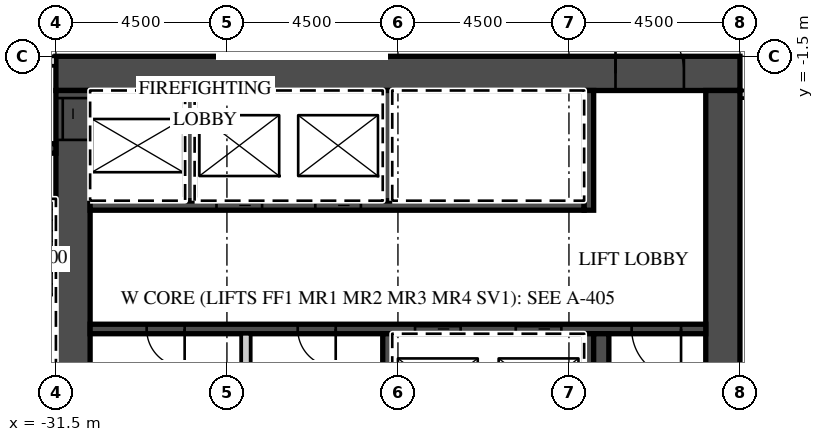
"""IFC4 building model, lengths in metres.
Left out: names, types, materials, properties, quantities, classifications, styles, units other than length and angle.
Written with IfcOpenShell. Run it as: python <this file> out.ifc"""

import sys

from ifc_helpers import new_model, si_unit, direction, frame, frame_2d, origin, place, context, subcontext, project, spatial, rectangle, extrude, element, fill, save


model = new_model("IFC4")
c1 = context("Model", 3, precision=1e-05, world=origin(), true_north=direction((0.0, 1.0)))
c2 = subcontext(c1, "Body", "Model", "MODEL_VIEW")
j1 = project(units=[si_unit("LENGTHUNIT", "METRE"), si_unit("PLANEANGLEUNIT", "RADIAN")], contexts=[c1])
p1 = place(None, origin())
s1 = spatial("IfcSite", under=j1, at=p1, CompositionType="ELEMENT")
p2 = place(p1, origin())
s2 = spatial("IfcBuilding", under=s1, at=p2, CompositionType="ELEMENT")
p3 = place(p2, frame((0.0, 0.0, 224.3)))
s3 = spatial("IfcBuildingStorey", under=s2, at=p3, CompositionType="ELEMENT", Elevation=224.3)
p4 = place(p3, frame((-13.5, -2.5, 0.0), z_axis=(0.0, 0.0, 1.0), x_axis=(1.0, 0.0, 0.0)))
e1 = element("IfcWall", 1, at=p4, inside=s3, PredefinedType="PARTITIONING", context=c2, shape_type="SweptSolid", body=[
    extrude(rectangle(XDim=27.0, YDim=0.2, at=frame_2d((13.5, 0.0))), origin(), (0.0, 0.0, 1.0), 3.02),
])
p5 = place(p4, frame((0.575, 0.0, 0.0)))
e2 = element("IfcOpeningElement", 2, at=p5, cuts=e1, PredefinedType="OPENING", context=c2, shape_type="SweptSolid", body=[
    extrude(rectangle(XDim=1.0, YDim=2.1, at=frame_2d((0.5, 1.05))), frame((0.0, 0.11, 0.0), z_axis=(0.0, -1.0, 0.0), x_axis=(1.0, 0.0, 0.0)), (0.0, 0.0, 1.0), 0.22),
])
p6 = place(p4, frame((6.938, 0.0, 0.0)))
e3 = element("IfcOpeningElement", 3, at=p6, cuts=e1, PredefinedType="OPENING", context=c2, shape_type="SweptSolid", body=[
    extrude(rectangle(XDim=1.2, YDim=2.1, at=frame_2d((0.6, 1.05))), frame((0.0, 0.11, 0.0), z_axis=(0.0, -1.0, 0.0), x_axis=(1.0, 0.0, 0.0)), (0.0, 0.0, 1.0), 0.22),
])
p7 = place(p4, frame((15.938, 0.0, 0.0)))
e4 = element("IfcOpeningElement", 4, at=p7, cuts=e1, PredefinedType="OPENING", context=c2, shape_type="SweptSolid", body=[
    extrude(rectangle(XDim=1.2, YDim=2.1, at=frame_2d((0.6, 1.05))), frame((0.0, 0.11, 0.0), z_axis=(0.0, -1.0, 0.0), x_axis=(1.0, 0.0, 0.0)), (0.0, 0.0, 1.0), 0.22),
])
p8 = place(p4, frame((25.425, 0.0, 0.0)))
e5 = element("IfcOpeningElement", 5, at=p8, cuts=e1, PredefinedType="OPENING", context=c2, shape_type="SweptSolid", body=[
    extrude(rectangle(XDim=1.0, YDim=2.1, at=frame_2d((0.5, 1.05))), frame((0.0, 0.11, 0.0), z_axis=(0.0, -1.0, 0.0), x_axis=(1.0, 0.0, 0.0)), (0.0, 0.0, 1.0), 0.22),
])
p9 = place(p3, frame((-31.5, -1.95, 0.0), z_axis=(0.0, 0.0, 1.0), x_axis=(1.0, 0.0, 0.0)))
e6 = element("IfcWall", 6, at=p9, inside=s3, PredefinedType="SHEAR", context=c2, shape_type="SweptSolid", body=[
    extrude(rectangle(XDim=18.0, YDim=0.9, at=frame_2d((9.0, 0.0))), origin(), (0.0, 0.0, 1.0), 3.02),
])
p10 = place(p9, frame((14.725, 0.0, 0.0)))
e7 = element("IfcOpeningElement", 7, at=p10, cuts=e6, PredefinedType="OPENING", context=c2, shape_type="SweptSolid", body=[
    extrude(rectangle(XDim=1.8, YDim=2.1, at=frame_2d((0.9, 1.05))), frame((0.0, 0.46, 0.0), z_axis=(0.0, -1.0, 0.0), x_axis=(1.0, 0.0, 0.0)), (0.0, 0.0, 1.0), 0.92),
])
p11 = place(p3, frame((-31.05, -15.2, 0.0), z_axis=(0.0, 0.0, 1.0), x_axis=(0.0, 1.0, 0.0)))
e8 = element("IfcWall", 8, at=p11, inside=s3, PredefinedType="SHEAR", context=c2, shape_type="SweptSolid", body=[
    extrude(rectangle(XDim=12.8, YDim=0.9, at=frame_2d((6.4, 0.0))), origin(), (0.0, 0.0, 1.0), 3.02),
])
p12 = place(p11, frame((11.5, 0.0, 0.0)))
e9 = element("IfcOpeningElement", 9, at=p12, cuts=e8, PredefinedType="OPENING", context=c2, shape_type="SweptSolid", body=[
    extrude(rectangle(XDim=1.1, YDim=2.1, at=frame_2d((0.55, 1.05))), frame((0.0, 0.46, 0.0), z_axis=(0.0, -1.0, 0.0), x_axis=(1.0, 0.0, 0.0)), (0.0, 0.0, 1.0), 0.92),
])
p13 = place(p3, frame((-13.95, -14.6, 0.0), z_axis=(0.0, 0.0, 1.0), x_axis=(0.0, 1.0, 0.0)))
e10 = element("IfcWall", 10, at=p13, inside=s3, PredefinedType="SHEAR", context=c2, shape_type="SweptSolid", body=[
    extrude(rectangle(XDim=12.2, YDim=0.9, at=frame_2d((6.1, 0.0))), origin(), (0.0, 0.0, 1.0), 3.02),
])
p14 = place(p3, frame((-30.6, -5.425, 0.0), z_axis=(0.0, 0.0, 1.0), x_axis=(1.0, 0.0, 0.0)))
e11 = element("IfcWall", 11, at=p14, inside=s3, PredefinedType="SHEAR", context=c2, shape_type="SweptSolid", body=[
    extrude(rectangle(XDim=13.0, YDim=0.25, at=frame_2d((6.5, 0.0))), origin(), (0.0, 0.0, 1.0), 3.02),
])
p15 = place(p14, frame((3.325, 0.0, 0.0)))
e12 = element("IfcOpeningElement", 12, at=p15, cuts=e11, PredefinedType="OPENING", context=c2, shape_type="SweptSolid", body=[
    extrude(rectangle(XDim=1.2, YDim=2.1, at=frame_2d((0.6, 1.05))), frame((0.0, 0.135, 0.0), z_axis=(0.0, -1.0, 0.0), x_axis=(1.0, 0.0, 0.0)), (0.0, 0.0, 1.0), 0.27),
])
p16 = place(p14, frame((5.925, 0.0, 0.0)))
e13 = element("IfcOpeningElement", 13, at=p16, cuts=e11, PredefinedType="OPENING", context=c2, shape_type="SweptSolid", body=[
    extrude(rectangle(XDim=1.2, YDim=2.1, at=frame_2d((0.6, 1.05))), frame((0.0, 0.135, 0.0), z_axis=(0.0, -1.0, 0.0), x_axis=(1.0, 0.0, 0.0)), (0.0, 0.0, 1.0), 0.27),
])
p17 = place(p3, frame((-17.475, -5.55, 0.0), z_axis=(0.0, 0.0, 1.0), x_axis=(0.0, 1.0, 0.0)))
e14 = element("IfcWall", 14, at=p17, inside=s3, PredefinedType="SHEAR", context=c2, shape_type="SweptSolid", body=[
    extrude(rectangle(XDim=3.15, YDim=0.25, at=frame_2d((1.575, 0.0))), origin(), (0.0, 0.0, 1.0), 3.02),
])
for number, where, z_axis, x_axis in (
    (15, (-27.975, -5.3, 0.0), (0.0, 0.0, 1.0), (0.0, 1.0, 0.0)),
    (16, (-22.775, -5.3, 0.0), (0.0, 0.0, 1.0), (0.0, 1.0, 0.0)),
):
    element("IfcWall", number, at=place(p3, frame(where, z_axis=z_axis, x_axis=x_axis)), inside=s3, PredefinedType="SHEAR", context=c2, shape_type="SweptSolid", body=[
        extrude(rectangle(XDim=2.9, YDim=0.25, at=frame_2d((1.45, 0.0))), origin(), (0.0, 0.0, 1.0), 3.02),
    ])
p18 = place(p3, frame((-30.6, -8.675, 0.0), z_axis=(0.0, 0.0, 1.0), x_axis=(1.0, 0.0, 0.0)))
e17 = element("IfcWall", 17, at=p18, inside=s3, PredefinedType="SHEAR", context=c2, shape_type="SweptSolid", body=[
    extrude(rectangle(XDim=16.2, YDim=0.25, at=frame_2d((8.1, 0.0))), origin(), (0.0, 0.0, 1.0), 3.02),
])
p19 = place(p18, frame((8.55, 0.0, 0.0)))
e18 = element("IfcOpeningElement", 18, at=p19, cuts=e17, PredefinedType="OPENING", context=c2, shape_type="SweptSolid", body=[
    extrude(rectangle(XDim=1.2, YDim=2.1, at=frame_2d((0.6, 1.05))), frame((0.0, 0.135, 0.0), z_axis=(0.0, -1.0, 0.0), x_axis=(1.0, 0.0, 0.0)), (0.0, 0.0, 1.0), 0.27),
])
p20 = place(p18, frame((11.2, 0.0, 0.0)))
e19 = element("IfcOpeningElement", 19, at=p20, cuts=e17, PredefinedType="OPENING", context=c2, shape_type="SweptSolid", body=[
    extrude(rectangle(XDim=1.2, YDim=2.1, at=frame_2d((0.6, 1.05))), frame((0.0, 0.135, 0.0), z_axis=(0.0, -1.0, 0.0), x_axis=(1.0, 0.0, 0.0)), (0.0, 0.0, 1.0), 0.27),
])
p21 = place(p18, frame((14.25, 0.0, 0.0)))
e20 = element("IfcOpeningElement", 20, at=p21, cuts=e17, PredefinedType="OPENING", context=c2, shape_type="SweptSolid", body=[
    extrude(rectangle(XDim=1.3, YDim=2.1, at=frame_2d((0.65, 1.05))), frame((0.0, 0.135, 0.0), z_axis=(0.0, -1.0, 0.0), x_axis=(1.0, 0.0, 0.0)), (0.0, 0.0, 1.0), 0.27),
])
p22 = place(p18, frame((1.488, 0.0, 0.0)))
e21 = element("IfcOpeningElement", 21, at=p22, cuts=e17, PredefinedType="OPENING", context=c2, shape_type="SweptSolid", body=[
    extrude(rectangle(XDim=1.0, YDim=2.1, at=frame_2d((0.5, 1.05))), frame((0.0, 0.135, 0.0), z_axis=(0.0, -1.0, 0.0), x_axis=(1.0, 0.0, 0.0)), (0.0, 0.0, 1.0), 0.27),
])
p23 = place(p18, frame((5.462, 0.0, 0.0)))
e22 = element("IfcOpeningElement", 22, at=p23, cuts=e17, PredefinedType="OPENING", context=c2, shape_type="SweptSolid", body=[
    extrude(rectangle(XDim=1.0, YDim=2.1, at=frame_2d((0.5, 1.05))), frame((0.0, 0.135, 0.0), z_axis=(0.0, -1.0, 0.0), x_axis=(1.0, 0.0, 0.0)), (0.0, 0.0, 1.0), 0.27),
])
for number, where, z_axis, x_axis in (
    (23, (-17.475, -11.7, 0.0), (0.0, 0.0, 1.0), (0.0, 1.0, 0.0)),
    (24, (-22.775, -11.7, 0.0), (0.0, 0.0, 1.0), (0.0, 1.0, 0.0)),
):
    element("IfcWall", number, at=place(p3, frame(where, z_axis=z_axis, x_axis=x_axis)), inside=s3, PredefinedType="SHEAR", context=c2, shape_type="SweptSolid", body=[
        extrude(rectangle(XDim=2.9, YDim=0.25, at=frame_2d((1.45, 0.0))), origin(), (0.0, 0.0, 1.0), 3.02),
    ])
p24 = place(p3, frame((-26.5, -11.7, 0.0), z_axis=(0.0, 0.0, 1.0), x_axis=(0.0, 1.0, 0.0)))
e25 = element("IfcWall", 25, at=p24, inside=s3, PredefinedType="PARTITIONING", context=c2, shape_type="SweptSolid", body=[
    extrude(rectangle(XDim=2.9, YDim=0.25, at=frame_2d((1.45, 0.0))), origin(), (0.0, 0.0, 1.0), 3.02),
])
p25 = place(p3, frame((-17.15, -14.6, 0.0), z_axis=(0.0, 0.0, 1.0), x_axis=(0.0, 1.0, 0.0)))
e26 = element("IfcWall", 26, at=p25, inside=s3, PredefinedType="SHEAR", context=c2, shape_type="SweptSolid", body=[
    extrude(rectangle(XDim=5.8, YDim=0.4, at=frame_2d((2.9, 0.0))), origin(), (0.0, 0.0, 1.0), 3.02),
])
p26 = place(p3, frame((-36.515, -1.625, 0.0), z_axis=(0.0, 0.0, 1.0), x_axis=(1.0, 0.0, 0.0)))
e27 = element("IfcWall", 27, at=p26, inside=s3, PredefinedType="PARTITIONING", context=c2, shape_type="SweptSolid", body=[
    extrude(rectangle(XDim=5.015, YDim=0.25, at=frame_2d((2.508, 0.0))), origin(), (0.0, 0.0, 1.0), 3.02),
])
p27 = place(p26, frame((3.09, 0.0, 0.0)))
e28 = element("IfcOpeningElement", 28, at=p27, cuts=e27, PredefinedType="OPENING", context=c2, shape_type="SweptSolid", body=[
    extrude(rectangle(XDim=1.3, YDim=2.1, at=frame_2d((0.65, 1.05))), frame((0.0, 0.135, 0.0), z_axis=(0.0, -1.0, 0.0), x_axis=(1.0, 0.0, 0.0)), (0.0, 0.0, 1.0), 0.27),
])
p28 = place(p26, frame((0.665, 0.0, 0.0)))
e29 = element("IfcOpeningElement", 29, at=p28, cuts=e27, PredefinedType="OPENING", context=c2, shape_type="SweptSolid", body=[
    extrude(rectangle(XDim=1.1, YDim=2.1, at=frame_2d((0.55, 1.05))), frame((0.0, 0.135, 0.0), z_axis=(0.0, -1.0, 0.0), x_axis=(1.0, 0.0, 0.0)), (0.0, 0.0, 1.0), 0.27),
])
p29 = place(p3, frame((-34.05, -3.925, 0.0), z_axis=(0.0, 0.0, 1.0), x_axis=(1.0, 0.0, 0.0)))
e30 = element("IfcWall", 30, at=p29, inside=s3, PredefinedType="SHEAR", context=c2, shape_type="SweptSolid", body=[
    extrude(rectangle(XDim=2.55, YDim=0.25, at=frame_2d((1.275, 0.0))), origin(), (0.0, 0.0, 1.0), 3.02),
])
p30 = place(p29, frame((0.625, 0.0, 0.0)))
e31 = element("IfcOpeningElement", 31, at=p30, cuts=e30, PredefinedType="OPENING", context=c2, shape_type="SweptSolid", body=[
    extrude(rectangle(XDim=1.3, YDim=2.1, at=frame_2d((0.65, 1.05))), frame((0.0, 0.135, 0.0), z_axis=(0.0, -1.0, 0.0), x_axis=(1.0, 0.0, 0.0)), (0.0, 0.0, 1.0), 0.27),
])
p31 = place(p19, origin())
e32 = element("IfcDoor", 32, at=p31, inside=s3, OperationType="SLIDING_TO_LEFT", PredefinedType="DOOR", context=c2, shape_type="SweptSolid", body=[
    extrude(rectangle(XDim=1.2, YDim=2.1, at=frame_2d((0.6, 1.05))), frame((0.0, 0.025, 0.0), z_axis=(0.0, -1.0, 0.0), x_axis=(1.0, 0.0, 0.0)), (0.0, 0.0, 1.0), 0.05),
])
fill(e18, e32)
p32 = place(p20, origin())
e33 = element("IfcDoor", 33, at=p32, inside=s3, OperationType="SLIDING_TO_RIGHT", PredefinedType="DOOR", context=c2, shape_type="SweptSolid", body=[
    extrude(rectangle(XDim=1.2, YDim=2.1, at=frame_2d((0.6, 1.05))), frame((0.0, 0.025, 0.0), z_axis=(0.0, -1.0, 0.0), x_axis=(1.0, 0.0, 0.0)), (0.0, 0.0, 1.0), 0.05),
])
fill(e19, e33)
p33 = place(p15, origin())
e34 = element("IfcDoor", 34, at=p33, inside=s3, OperationType="SLIDING_TO_RIGHT", PredefinedType="DOOR", context=c2, shape_type="SweptSolid", body=[
    extrude(rectangle(XDim=1.2, YDim=2.1, at=frame_2d((0.6, 1.05))), frame((0.0, 0.025, 0.0), z_axis=(0.0, -1.0, 0.0), x_axis=(1.0, 0.0, 0.0)), (0.0, 0.0, 1.0), 0.05),
])
fill(e12, e34)
p34 = place(p16, origin())
e35 = element("IfcDoor", 35, at=p34, inside=s3, OperationType="SLIDING_TO_RIGHT", PredefinedType="DOOR", context=c2, shape_type="SweptSolid", body=[
    extrude(rectangle(XDim=1.2, YDim=2.1, at=frame_2d((0.6, 1.05))), frame((0.0, 0.025, 0.0), z_axis=(0.0, -1.0, 0.0), x_axis=(1.0, 0.0, 0.0)), (0.0, 0.0, 1.0), 0.05),
])
fill(e13, e35)
p35 = place(p12, origin())
e36 = element("IfcDoor", 36, at=p35, inside=s3, OperationType="SLIDING_TO_RIGHT", PredefinedType="DOOR", context=c2, shape_type="SweptSolid", body=[
    extrude(rectangle(XDim=1.1, YDim=2.1, at=frame_2d((0.55, 1.05))), frame((0.0, 0.025, 0.0), z_axis=(0.0, -1.0, 0.0), x_axis=(1.0, 0.0, 0.0)), (0.0, 0.0, 1.0), 0.05),
])
fill(e9, e36)
p36 = place(p10, origin())
e37 = element("IfcDoor", 37, at=p36, inside=s3, OperationType="DOUBLE_DOOR_DOUBLE_SWING", PredefinedType="DOOR", context=c2, shape_type="SweptSolid", body=[
    extrude(rectangle(XDim=1.8, YDim=2.1, at=frame_2d((0.9, 1.05))), frame((0.0, 0.025, 0.0), z_axis=(0.0, -1.0, 0.0), x_axis=(1.0, 0.0, 0.0)), (0.0, 0.0, 1.0), 0.05),
])
fill(e7, e37)
p37 = place(p21, origin())
e38 = element("IfcDoor", 38, at=p37, inside=s3, OperationType="SINGLE_SWING_RIGHT", PredefinedType="DOOR", context=c2, shape_type="SweptSolid", body=[
    extrude(rectangle(XDim=1.3, YDim=2.1, at=frame_2d((0.65, 1.05))), frame((0.0, 0.025, 0.0), z_axis=(0.0, -1.0, 0.0), x_axis=(1.0, 0.0, 0.0)), (0.0, 0.0, 1.0), 0.05),
])
fill(e20, e38)
p38 = place(p22, origin())
e39 = element("IfcDoor", 39, at=p38, inside=s3, OperationType="SINGLE_SWING_RIGHT", PredefinedType="DOOR", context=c2, shape_type="SweptSolid", body=[
    extrude(rectangle(XDim=1.0, YDim=2.1, at=frame_2d((0.5, 1.05))), frame((0.0, 0.025, 0.0), z_axis=(0.0, -1.0, 0.0), x_axis=(1.0, 0.0, 0.0)), (0.0, 0.0, 1.0), 0.05),
])
fill(e21, e39)
p39 = place(p23, origin())
e40 = element("IfcDoor", 40, at=p39, inside=s3, OperationType="SINGLE_SWING_RIGHT", PredefinedType="DOOR", context=c2, shape_type="SweptSolid", body=[
    extrude(rectangle(XDim=1.0, YDim=2.1, at=frame_2d((0.5, 1.05))), frame((0.0, 0.025, 0.0), z_axis=(0.0, -1.0, 0.0), x_axis=(1.0, 0.0, 0.0)), (0.0, 0.0, 1.0), 0.05),
])
fill(e22, e40)
save(model, sys.argv[1])
